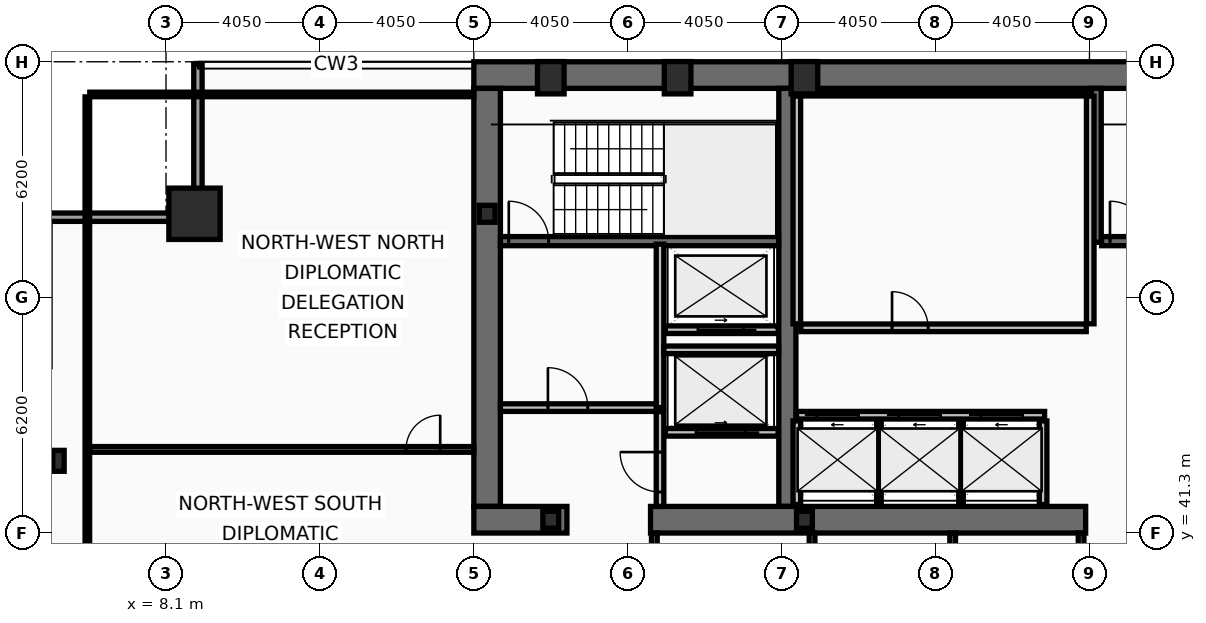
"""IFC4 building model, lengths in metres.
Left out: names, types, materials, properties, quantities, classifications, styles, units other than length and angle.
Written with IfcOpenShell. Run it as: python <this file> out.ifc"""

import sys

from ifc_helpers import new_model, si_unit, direction, frame, frame_2d, origin, origin_2d, place, context, subcontext, project, spatial, rectangle, hollow_rectangle, i_section, extrude, element, fill, save


model = new_model("IFC4")
c1 = context("Model", 3, precision=1e-05, world=origin(), true_north=direction((0.0, 1.0)))
c2 = subcontext(c1, "Body", "Model", "MODEL_VIEW")
j1 = project(units=[si_unit("LENGTHUNIT", "METRE"), si_unit("PLANEANGLEUNIT", "RADIAN")], contexts=[c1])
p1 = place(None, origin())
s1 = spatial("IfcSite", under=j1, at=p1, CompositionType="ELEMENT")
p2 = place(p1, origin())
s2 = spatial("IfcBuilding", under=s1, at=p2, CompositionType="ELEMENT")
p3 = place(p2, frame((0.0, 0.0, 143.4)))
s3 = spatial("IfcBuildingStorey", under=s2, at=p3, CompositionType="ELEMENT", Elevation=143.4)
p4 = place(p3, frame((16.2, 53.35, 0.0), z_axis=(0.0, 0.0, 1.0), x_axis=(1.0, 0.0, 0.0)))
e1 = element("IfcWall", 1, at=p4, inside=s3, PredefinedType="SHEAR", context=c2, shape_type="SweptSolid", body=[
    extrude(rectangle(XDim=40.5, YDim=0.7, at=frame_2d((20.25, 0.0))), origin(), (0.0, 0.0, 1.0), 3.44),
])
p5 = place(p3, frame((16.55, 42.0, 0.0), z_axis=(0.0, 0.0, 1.0), x_axis=(0.0, 1.0, 0.0)))
e2 = element("IfcWall", 2, at=p5, inside=s3, PredefinedType="SHEAR", context=c2, shape_type="SweptSolid", body=[
    extrude(rectangle(XDim=11.0, YDim=0.7, at=frame_2d((5.5, 0.0))), origin(), (0.0, 0.0, 1.0), 3.44),
])
p6 = place(p3, frame((24.45, 42.0, 0.0), z_axis=(0.0, 0.0, 1.0), x_axis=(0.0, 1.0, 0.0)))
e3 = element("IfcWall", 3, at=p6, inside=s3, PredefinedType="SHEAR", context=c2, shape_type="SweptSolid", body=[
    extrude(rectangle(XDim=11.0, YDim=0.45, at=frame_2d((5.5, 0.0))), origin(), (0.0, 0.0, 1.0), 3.44),
])
p7 = place(p3, frame((18.65, 41.65, 0.0), z_axis=(0.0, 0.0, 1.0), x_axis=(-1.0, 0.0, 0.0)))
e4 = element("IfcWall", 4, at=p7, inside=s3, PredefinedType="SHEAR", context=c2, shape_type="SweptSolid", body=[
    extrude(rectangle(XDim=2.45, YDim=0.7, at=frame_2d((1.225, 0.0))), origin(), (0.0, 0.0, 1.0), 3.44),
])
p8 = place(p3, frame((32.3, 41.65, 0.0), z_axis=(0.0, 0.0, 1.0), x_axis=(-1.0, 0.0, 0.0)))
e5 = element("IfcWall", 5, at=p8, inside=s3, PredefinedType="SHEAR", context=c2, shape_type="SweptSolid", body=[
    extrude(rectangle(XDim=11.45, YDim=0.7, at=frame_2d((5.725, 0.0))), origin(), (0.0, 0.0, 1.0), 3.44),
])
p9 = place(p3, frame((32.58, 48.95, 0.0), z_axis=(0.0, 0.0, 1.0), x_axis=(0.0, 1.0, 0.0)))
e6 = element("IfcWall", 6, at=p9, inside=s3, PredefinedType="SHEAR", context=c2, shape_type="SweptSolid", body=[
    extrude(rectangle(XDim=4.05, YDim=0.26, at=frame_2d((2.025, 0.0))), origin(), (0.0, 0.0, 1.0), 3.44),
])
p10 = place(p3, frame((16.9, 48.98, 0.0), z_axis=(0.0, 0.0, 1.0), x_axis=(1.0, 0.0, 0.0)))
e7 = element("IfcWall", 7, at=p10, inside=s3, PredefinedType="SHEAR", context=c2, shape_type="SweptSolid", body=[
    extrude(rectangle(XDim=7.32, YDim=0.24, at=frame_2d((3.66, 0.0))), origin(), (0.0, 0.0, 1.0), 3.44),
])
p11 = place(p10, frame((0.22, 0.0, 0.0)))
e8 = element("IfcOpeningElement", 8, at=p11, cuts=e7, PredefinedType="OPENING", context=c2, shape_type="SweptSolid", body=[
    extrude(rectangle(XDim=1.05, YDim=2.15, at=frame_2d((0.525, 1.075))), frame((0.0, 0.13, 0.0), z_axis=(0.0, -1.0, 0.0), x_axis=(1.0, 0.0, 0.0)), (0.0, 0.0, 1.0), 0.26),
])
p12 = place(p3, frame((32.72, 48.98, 0.0), z_axis=(0.0, 0.0, 1.0), x_axis=(1.0, 0.0, 0.0)))
e9 = element("IfcWall", 9, at=p12, inside=s3, PredefinedType="SHEAR", context=c2, shape_type="SweptSolid", body=[
    extrude(rectangle(XDim=7.56, YDim=0.24, at=frame_2d((3.78, 0.0))), origin(), (0.0, 0.0, 1.0), 3.44),
])
p13 = place(p12, frame((0.22, 0.0, 0.0)))
e10 = element("IfcOpeningElement", 10, at=p13, cuts=e9, PredefinedType="OPENING", context=c2, shape_type="SweptSolid", body=[
    extrude(rectangle(XDim=1.05, YDim=2.15, at=frame_2d((0.525, 1.075))), frame((0.0, 0.13, 0.0), z_axis=(0.0, -1.0, 0.0), x_axis=(1.0, 0.0, 0.0)), (0.0, 0.0, 1.0), 0.26),
])
p14 = place(p3, frame((8.85, 49.7, 0.0), z_axis=(0.0, 0.0, 1.0), x_axis=(1.0, 0.0, 0.0)))
e11 = element("IfcColumn", 11, at=p14, inside=s3, PredefinedType="COLUMN", context=c2, shape_type="SweptSolid", body=[
    extrude(hollow_rectangle(XDim=1.35, YDim=1.35, WallThickness=0.065, at=origin_2d()), origin(), (0.0, 0.0, 1.0), 3.6),
])
for number, where, z_axis, x_axis in (
    (12, (18.225, 53.28, 0.0), (0.0, 0.0, 1.0), (1.0, 0.0, 0.0)),
    (13, (21.562, 53.28, 0.0), (0.0, 0.0, 1.0), (1.0, 0.0, 0.0)),
    (14, (24.9, 53.28, 0.0), (0.0, 0.0, 1.0), (1.0, 0.0, 0.0)),
):
    element("IfcColumn", number, at=place(p3, frame(where, z_axis=z_axis, x_axis=x_axis)), inside=s3, PredefinedType="COLUMN", context=c2, shape_type="SweptSolid", body=[
        extrude(hollow_rectangle(XDim=0.7, YDim=0.85, WallThickness=0.05, at=origin_2d()), origin(), (0.0, 0.0, 1.0), 3.6),
    ])
p15 = place(p3, frame((5.27, 43.2, 0.0), z_axis=(0.0, 0.0, 1.0), x_axis=(1.0, 0.0, 0.0)))
e15 = element("IfcColumn", 15, at=p15, inside=s3, PredefinedType="COLUMN", context=c2, shape_type="SweptSolid", body=[
    extrude(i_section(OverallWidth=0.3, OverallDepth=0.55, WebThickness=0.015, FlangeThickness=0.029, at=origin_2d()), origin(), (0.0, 0.0, 1.0), 3.6),
])
for number, where, z_axis, x_axis in (
    (16, (16.55, 49.7, 0.0), (0.0, 0.0, 1.0), (1.0, 0.0, 0.0)),
    (17, (18.225, 41.65, 0.0), (0.0, 0.0, 1.0), (1.0, 0.0, 0.0)),
    (18, (24.9, 41.65, 0.0), (0.0, 0.0, 1.0), (1.0, 0.0, 0.0)),
):
    element("IfcColumn", number, at=place(p3, frame(where, z_axis=z_axis, x_axis=x_axis)), inside=s3, PredefinedType="COLUMN", context=c2, shape_type="SweptSolid", body=[
        extrude(i_section(OverallWidth=0.416, OverallDepth=0.446, WebThickness=0.039, FlangeThickness=0.063, at=origin_2d()), origin(), (0.0, 0.0, 1.0), 3.6),
    ])
p16 = place(p3, frame((4.83, 49.61, 0.0), z_axis=(0.0, 0.0, 1.0), x_axis=(1.0, 0.0, 0.0)))
e19 = element("IfcWall", 19, at=p16, inside=s3, PredefinedType="SOLIDWALL", context=c2, shape_type="SweptSolid", body=[
    extrude(rectangle(XDim=4.22, YDim=0.22, at=frame_2d((2.11, 0.0))), origin(), (0.0, 0.0, 1.0), 2.83),
])
p17 = place(p3, frame((8.94, 49.72, 0.0), z_axis=(0.0, 0.0, 1.0), x_axis=(0.0, 1.0, 0.0)))
e20 = element("IfcWall", 20, at=p17, inside=s3, PredefinedType="SOLIDWALL", context=c2, shape_type="SweptSolid", body=[
    extrude(rectangle(XDim=3.91, YDim=0.22, at=frame_2d((1.955, 0.0))), origin(), (0.0, 0.0, 1.0), 2.83),
])
p18 = place(p3, frame((24.69, 44.4, 0.0), z_axis=(0.0, 0.0, 1.0), x_axis=(1.0, 0.0, 0.0)))
e21 = element("IfcWall", 21, at=p18, inside=s3, PredefinedType="PARTITIONING", context=c2, shape_type="SweptSolid", body=[
    extrude(rectangle(XDim=6.53, YDim=0.2, at=frame_2d((3.265, 0.0))), origin(), (0.0, 0.0, 1.0), 3.44),
])
p19 = place(p18, frame((0.53, 0.0, 0.0)))
e22 = element("IfcOpeningElement", 22, at=p19, cuts=e21, PredefinedType="OPENING", context=c2, shape_type="SweptSolid", body=[
    extrude(rectangle(XDim=1.1, YDim=2.18, at=frame_2d((0.55, 1.09))), frame((0.0, 0.11, 0.0), z_axis=(0.0, -1.0, 0.0), x_axis=(1.0, 0.0, 0.0)), (0.0, 0.0, 1.0), 0.22),
])
p20 = place(p18, frame((2.69, 0.0, 0.0)))
e23 = element("IfcOpeningElement", 23, at=p20, cuts=e21, PredefinedType="OPENING", context=c2, shape_type="SweptSolid", body=[
    extrude(rectangle(XDim=1.1, YDim=2.18, at=frame_2d((0.55, 1.09))), frame((0.0, 0.11, 0.0), z_axis=(0.0, -1.0, 0.0), x_axis=(1.0, 0.0, 0.0)), (0.0, 0.0, 1.0), 0.22),
])
p21 = place(p18, frame((4.85, 0.0, 0.0)))
e24 = element("IfcOpeningElement", 24, at=p21, cuts=e21, PredefinedType="OPENING", context=c2, shape_type="SweptSolid", body=[
    extrude(rectangle(XDim=1.1, YDim=2.18, at=frame_2d((0.55, 1.09))), frame((0.0, 0.11, 0.0), z_axis=(0.0, -1.0, 0.0), x_axis=(1.0, 0.0, 0.0)), (0.0, 0.0, 1.0), 0.22),
])
p22 = place(p3, frame((24.21, 43.95, 0.0), z_axis=(0.0, 0.0, 1.0), x_axis=(-1.0, 0.0, 0.0)))
e25 = element("IfcWall", 25, at=p22, inside=s3, PredefinedType="PARTITIONING", context=c2, shape_type="SweptSolid", body=[
    extrude(rectangle(XDim=2.97, YDim=0.2, at=frame_2d((1.485, 0.0))), origin(), (0.0, 0.0, 1.0), 3.44),
])
p23 = place(p22, frame((0.86, 0.0, 0.0)))
e26 = element("IfcOpeningElement", 26, at=p23, cuts=e25, PredefinedType="OPENING", context=c2, shape_type="SweptSolid", body=[
    extrude(rectangle(XDim=1.3, YDim=2.18, at=frame_2d((0.65, 1.09))), frame((0.0, 0.11, 0.0), z_axis=(0.0, -1.0, 0.0), x_axis=(1.0, 0.0, 0.0)), (0.0, 0.0, 1.0), 0.22),
])
p24 = place(p3, frame((24.21, 46.65, 0.0), z_axis=(0.0, 0.0, 1.0), x_axis=(-1.0, 0.0, 0.0)))
e27 = element("IfcWall", 27, at=p24, inside=s3, PredefinedType="PARTITIONING", context=c2, shape_type="SweptSolid", body=[
    extrude(rectangle(XDim=2.97, YDim=0.2, at=frame_2d((1.485, 0.0))), origin(), (0.0, 0.0, 1.0), 3.44),
])
p25 = place(p24, frame((0.91, 0.0, 0.0)))
e28 = element("IfcOpeningElement", 28, at=p25, cuts=e27, PredefinedType="OPENING", context=c2, shape_type="SweptSolid", body=[
    extrude(rectangle(XDim=1.2, YDim=2.18, at=frame_2d((0.6, 1.09))), frame((0.0, 0.11, 0.0), z_axis=(0.0, -1.0, 0.0), x_axis=(1.0, 0.0, 0.0)), (0.0, 0.0, 1.0), 0.22),
])
p26 = place(p3, frame((21.1, 44.6, 0.0), z_axis=(0.0, 0.0, 1.0), x_axis=(0.0, 1.0, 0.0)))
e29 = element("IfcWall", 29, at=p26, inside=s3, PredefinedType="PARTITIONING", context=c2, shape_type="SweptSolid", body=[
    extrude(rectangle(XDim=4.3, YDim=0.2, at=frame_2d((2.15, 0.0))), origin(), (0.0, 0.0, 1.0), 3.44),
])
p27 = place(p3, frame((16.9, 44.6, 0.0), z_axis=(0.0, 0.0, 1.0), x_axis=(1.0, 0.0, 0.0)))
e30 = element("IfcWall", 30, at=p27, inside=s3, PredefinedType="PARTITIONING", context=c2, shape_type="SweptSolid", body=[
    extrude(rectangle(XDim=4.1, YDim=0.2, at=frame_2d((2.05, 0.0))), origin(), (0.0, 0.0, 1.0), 3.44),
])
p28 = place(p27, frame((1.25, 0.0, 0.0)))
e31 = element("IfcOpeningElement", 31, at=p28, cuts=e30, PredefinedType="OPENING", context=c2, shape_type="SweptSolid", body=[
    extrude(rectangle(XDim=1.05, YDim=2.15, at=frame_2d((0.525, 1.075))), frame((0.0, 0.11, 0.0), z_axis=(0.0, -1.0, 0.0), x_axis=(1.0, 0.0, 0.0)), (0.0, 0.0, 1.0), 0.22),
])
p29 = place(p3, frame((21.2, 46.12, 0.0), z_axis=(0.0, 0.0, 1.0), x_axis=(1.0, 0.0, 0.0)))
e32 = element("IfcWall", 32, at=p29, inside=s3, PredefinedType="PARTITIONING", context=c2, shape_type="SweptSolid", body=[
    extrude(rectangle(XDim=3.02, YDim=0.2, at=frame_2d((1.51, 0.0))), origin(), (0.0, 0.0, 1.0), 3.44),
])
p30 = place(p3, frame((21.1, 42.0, 0.0), z_axis=(0.0, 0.0, 1.0), x_axis=(0.0, 1.0, 0.0)))
e33 = element("IfcWall", 33, at=p30, inside=s3, PredefinedType="PARTITIONING", context=c2, shape_type="SweptSolid", body=[
    extrude(rectangle(XDim=2.495, YDim=0.2, at=frame_2d((1.248, 0.0))), origin(), (0.0, 0.0, 1.0), 3.44),
])
p31 = place(p30, frame((0.38, 0.0, 0.0)))
e34 = element("IfcOpeningElement", 34, at=p31, cuts=e33, PredefinedType="OPENING", context=c2, shape_type="SweptSolid", body=[
    extrude(rectangle(XDim=1.05, YDim=2.15, at=frame_2d((0.525, 1.075))), frame((0.0, 0.11, 0.0), z_axis=(0.0, -1.0, 0.0), x_axis=(1.0, 0.0, 0.0)), (0.0, 0.0, 1.0), 0.22),
])
for number, where, z_axis, x_axis in (
    (35, (24.7, 46.805, 0.0), (0.0, 0.0, 1.0), (0.0, 1.0, 0.0)),
    (36, (32.42, 46.805, 0.0), (0.0, 0.0, 1.0), (0.0, 1.0, 0.0)),
):
    element("IfcWall", number, at=place(p3, frame(where, z_axis=z_axis, x_axis=x_axis)), inside=s3, PredefinedType="PARTITIONING", context=c2, shape_type="SweptSolid", body=[
        extrude(rectangle(XDim=5.99, YDim=0.2, at=frame_2d((2.995, 0.0))), origin(), (0.0, 0.0, 1.0), 3.44),
    ])
p32 = place(p3, frame((24.805, 52.86, 0.0), z_axis=(0.0, 0.0, 1.0), x_axis=(1.0, 0.0, 0.0)))
e37 = element("IfcWall", 37, at=p32, inside=s3, PredefinedType="PARTITIONING", context=c2, shape_type="SweptSolid", body=[
    extrude(rectangle(XDim=7.51, YDim=0.12, at=frame_2d((3.755, 0.0))), origin(), (0.0, 0.0, 1.0), 3.44),
])
p33 = place(p3, frame((24.805, 46.7, 0.0), z_axis=(0.0, 0.0, 1.0), x_axis=(1.0, 0.0, 0.0)))
e38 = element("IfcWall", 38, at=p33, inside=s3, PredefinedType="PARTITIONING", context=c2, shape_type="SweptSolid", body=[
    extrude(rectangle(XDim=7.51, YDim=0.2, at=frame_2d((3.755, 0.0))), origin(), (0.0, 0.0, 1.0), 3.44),
])
p34 = place(p33, frame((2.4, 0.0, 0.0)))
e39 = element("IfcOpeningElement", 39, at=p34, cuts=e38, PredefinedType="OPENING", context=c2, shape_type="SweptSolid", body=[
    extrude(rectangle(XDim=0.95, YDim=2.1, at=frame_2d((0.475, 1.05))), frame((0.0, 0.11, 0.0), z_axis=(0.0, -1.0, 0.0), x_axis=(1.0, 0.0, 0.0)), (0.0, 0.0, 1.0), 0.22),
])
for number, where, z_axis, x_axis in (
    (40, (24.7, 42.05, 0.0), (0.0, 0.0, 1.0), (0.0, 1.0, 0.0)),
    (41, (31.18, 42.05, 0.0), (0.0, 0.0, 1.0), (0.0, 1.0, 0.0)),
):
    element("IfcWall", number, at=place(p3, frame(where, z_axis=z_axis, x_axis=x_axis)), inside=s3, PredefinedType="PARTITIONING", context=c2, shape_type="SweptSolid", body=[
        extrude(rectangle(XDim=2.2, YDim=0.2, at=frame_2d((1.1, 0.0))), origin(), (0.0, 0.0, 1.0), 3.44),
    ])
for number, where, z_axis, x_axis in (
    (42, (26.86, 42.05, 0.0), (0.0, 0.0, 1.0), (0.0, 1.0, 0.0)),
    (43, (29.02, 42.05, 0.0), (0.0, 0.0, 1.0), (0.0, 1.0, 0.0)),
):
    element("IfcWall", number, at=place(p3, frame(where, z_axis=z_axis, x_axis=x_axis)), inside=s3, PredefinedType="PARTITIONING", context=c2, shape_type="SweptSolid", body=[
        extrude(rectangle(XDim=2.2, YDim=0.12, at=frame_2d((1.1, 0.0))), origin(), (0.0, 0.0, 1.0), 3.44),
    ])
p35 = place(p3, frame((20.95, 38.28, 0.0), z_axis=(0.0, 0.0, 1.0), x_axis=(0.0, 1.0, 0.0)))
e44 = element("IfcWall", 44, at=p35, inside=s3, PredefinedType="PARTITIONING", context=c2, shape_type="SweptSolid", body=[
    extrude(rectangle(XDim=3.02, YDim=0.15, at=frame_2d((1.51, 0.0))), origin(), (0.0, 0.0, 1.0), 3.44),
])
p36 = place(p3, frame((25.1, 38.28, 0.0), z_axis=(0.0, 0.0, 1.0), x_axis=(0.0, 1.0, 0.0)))
e45 = element("IfcWall", 45, at=p36, inside=s3, PredefinedType="PARTITIONING", context=c2, shape_type="SweptSolid", body=[
    extrude(rectangle(XDim=3.02, YDim=0.15, at=frame_2d((1.51, 0.0))), origin(), (0.0, 0.0, 1.0), 2.73),
])
for number, where, z_axis, x_axis in (
    (46, (28.8, 38.28, 0.0), (0.0, 0.0, 1.0), (0.0, 1.0, 0.0)),
    (47, (32.18, 38.28, 0.0), (0.0, 0.0, 1.0), (0.0, 1.0, 0.0)),
):
    element("IfcWall", number, at=place(p3, frame(where, z_axis=z_axis, x_axis=x_axis)), inside=s3, PredefinedType="PARTITIONING", context=c2, shape_type="SweptSolid", body=[
        extrude(rectangle(XDim=3.02, YDim=0.15, at=frame_2d((1.51, 0.0))), origin(), (0.0, 0.0, 1.0), 3.44),
    ])
p37 = place(p3, frame((6.095, 43.5, 0.0), z_axis=(0.0, 0.0, 1.0), x_axis=(1.0, 0.0, 0.0)))
e48 = element("IfcWall", 48, at=p37, inside=s3, PredefinedType="PARTITIONING", context=c2, shape_type="SweptSolid", body=[
    extrude(rectangle(XDim=10.105, YDim=0.15, at=frame_2d((5.052, 0.0))), origin(), (0.0, 0.0, 1.0), 2.73),
])
p38 = place(p37, frame((8.32, 0.0, 0.0)))
e49 = element("IfcOpeningElement", 49, at=p38, cuts=e48, PredefinedType="OPENING", context=c2, shape_type="SweptSolid", body=[
    extrude(rectangle(XDim=0.9, YDim=2.05, at=frame_2d((0.45, 1.025))), frame((0.0, 0.085, 0.0), z_axis=(0.0, -1.0, 0.0), x_axis=(1.0, 0.0, 0.0)), (0.0, 0.0, 1.0), 0.17),
])
p39 = place(p3, frame((6.03, 10.665, 0.0), z_axis=(0.0, 0.0, 1.0), x_axis=(0.0, 1.0, 0.0)))
e50 = element("IfcWall", 50, at=p39, inside=s3, PredefinedType="PARTITIONING", context=c2, shape_type="SweptSolid", body=[
    extrude(rectangle(XDim=42.11, YDim=0.12, at=frame_2d((21.055, 0.0))), origin(), (0.0, 0.0, 1.0), 2.73),
])
p40 = place(p3, frame((6.095, 52.84, 0.0), z_axis=(0.0, 0.0, 1.0), x_axis=(1.0, 0.0, 0.0)))
e51 = element("IfcWall", 51, at=p40, inside=s3, PredefinedType="PARTITIONING", context=c2, shape_type="SweptSolid", body=[
    extrude(rectangle(XDim=10.105, YDim=0.12, at=frame_2d((5.052, 0.0))), origin(), (0.0, 0.0, 1.0), 3.44),
])
p41 = place(p11, origin())
e52 = element("IfcDoor", 52, at=p41, inside=s3, OperationType="SINGLE_SWING_LEFT", PredefinedType="DOOR", context=c2, shape_type="SweptSolid", body=[
    extrude(rectangle(XDim=1.05, YDim=2.15, at=frame_2d((0.525, 1.075))), frame((0.0, 0.025, 0.0), z_axis=(0.0, -1.0, 0.0), x_axis=(1.0, 0.0, 0.0)), (0.0, 0.0, 1.0), 0.05),
])
fill(e8, e52)
p42 = place(p13, origin())
e53 = element("IfcDoor", 53, at=p42, inside=s3, OperationType="SINGLE_SWING_LEFT", PredefinedType="DOOR", context=c2, shape_type="SweptSolid", body=[
    extrude(rectangle(XDim=1.05, YDim=2.15, at=frame_2d((0.525, 1.075))), frame((0.0, 0.025, 0.0), z_axis=(0.0, -1.0, 0.0), x_axis=(1.0, 0.0, 0.0)), (0.0, 0.0, 1.0), 0.05),
])
fill(e10, e53)
p43 = place(p19, origin())
e54 = element("IfcDoor", 54, at=p43, inside=s3, OperationType="SLIDING_TO_LEFT", PredefinedType="DOOR", context=c2, shape_type="SweptSolid", body=[
    extrude(rectangle(XDim=1.1, YDim=2.18, at=frame_2d((0.55, 1.09))), frame((0.0, 0.025, 0.0), z_axis=(0.0, -1.0, 0.0), x_axis=(1.0, 0.0, 0.0)), (0.0, 0.0, 1.0), 0.05),
])
fill(e22, e54)
p44 = place(p20, origin())
e55 = element("IfcDoor", 55, at=p44, inside=s3, OperationType="SLIDING_TO_LEFT", PredefinedType="DOOR", context=c2, shape_type="SweptSolid", body=[
    extrude(rectangle(XDim=1.1, YDim=2.18, at=frame_2d((0.55, 1.09))), frame((0.0, 0.025, 0.0), z_axis=(0.0, -1.0, 0.0), x_axis=(1.0, 0.0, 0.0)), (0.0, 0.0, 1.0), 0.05),
])
fill(e23, e55)
p45 = place(p21, origin())
e56 = element("IfcDoor", 56, at=p45, inside=s3, OperationType="SLIDING_TO_LEFT", PredefinedType="DOOR", context=c2, shape_type="SweptSolid", body=[
    extrude(rectangle(XDim=1.1, YDim=2.18, at=frame_2d((0.55, 1.09))), frame((0.0, 0.025, 0.0), z_axis=(0.0, -1.0, 0.0), x_axis=(1.0, 0.0, 0.0)), (0.0, 0.0, 1.0), 0.05),
])
fill(e24, e56)
p46 = place(p23, origin())
e57 = element("IfcDoor", 57, at=p46, inside=s3, OperationType="SLIDING_TO_LEFT", PredefinedType="DOOR", context=c2, shape_type="SweptSolid", body=[
    extrude(rectangle(XDim=1.3, YDim=2.18, at=frame_2d((0.65, 1.09))), frame((0.0, 0.025, 0.0), z_axis=(0.0, -1.0, 0.0), x_axis=(1.0, 0.0, 0.0)), (0.0, 0.0, 1.0), 0.05),
])
fill(e26, e57)
p47 = place(p25, origin())
e58 = element("IfcDoor", 58, at=p47, inside=s3, OperationType="SLIDING_TO_LEFT", PredefinedType="DOOR", context=c2, shape_type="SweptSolid", body=[
    extrude(rectangle(XDim=1.2, YDim=2.18, at=frame_2d((0.6, 1.09))), frame((0.0, 0.025, 0.0), z_axis=(0.0, -1.0, 0.0), x_axis=(1.0, 0.0, 0.0)), (0.0, 0.0, 1.0), 0.05),
])
fill(e28, e58)
p48 = place(p28, origin())
e59 = element("IfcDoor", 59, at=p48, inside=s3, OperationType="SINGLE_SWING_LEFT", PredefinedType="DOOR", context=c2, shape_type="SweptSolid", body=[
    extrude(rectangle(XDim=1.05, YDim=2.15, at=frame_2d((0.525, 1.075))), frame((0.0, 0.025, 0.0), z_axis=(0.0, -1.0, 0.0), x_axis=(1.0, 0.0, 0.0)), (0.0, 0.0, 1.0), 0.05),
])
fill(e31, e59)
p49 = place(p31, origin())
e60 = element("IfcDoor", 60, at=p49, inside=s3, OperationType="SINGLE_SWING_RIGHT", PredefinedType="DOOR", context=c2, shape_type="SweptSolid", body=[
    extrude(rectangle(XDim=1.05, YDim=2.15, at=frame_2d((0.525, 1.075))), frame((0.0, 0.025, 0.0), z_axis=(0.0, -1.0, 0.0), x_axis=(1.0, 0.0, 0.0)), (0.0, 0.0, 1.0), 0.05),
])
fill(e34, e60)
p50 = place(p34, origin())
e61 = element("IfcDoor", 61, at=p50, inside=s3, OperationType="SINGLE_SWING_LEFT", PredefinedType="DOOR", context=c2, shape_type="SweptSolid", body=[
    extrude(rectangle(XDim=0.95, YDim=2.1, at=frame_2d((0.475, 1.05))), frame((0.0, 0.025, 0.0), z_axis=(0.0, -1.0, 0.0), x_axis=(1.0, 0.0, 0.0)), (0.0, 0.0, 1.0), 0.05),
])
fill(e39, e61)
p51 = place(p38, origin())
e62 = element("IfcDoor", 62, at=p51, inside=s3, OperationType="SINGLE_SWING_RIGHT", PredefinedType="DOOR", context=c2, shape_type="SweptSolid", body=[
    extrude(rectangle(XDim=0.9, YDim=2.05, at=frame_2d((0.45, 1.025))), frame((0.0, 0.025, 0.0), z_axis=(0.0, -1.0, 0.0), x_axis=(1.0, 0.0, 0.0)), (0.0, 0.0, 1.0), 0.05),
])
fill(e49, e62)
save(model, sys.argv[1])
